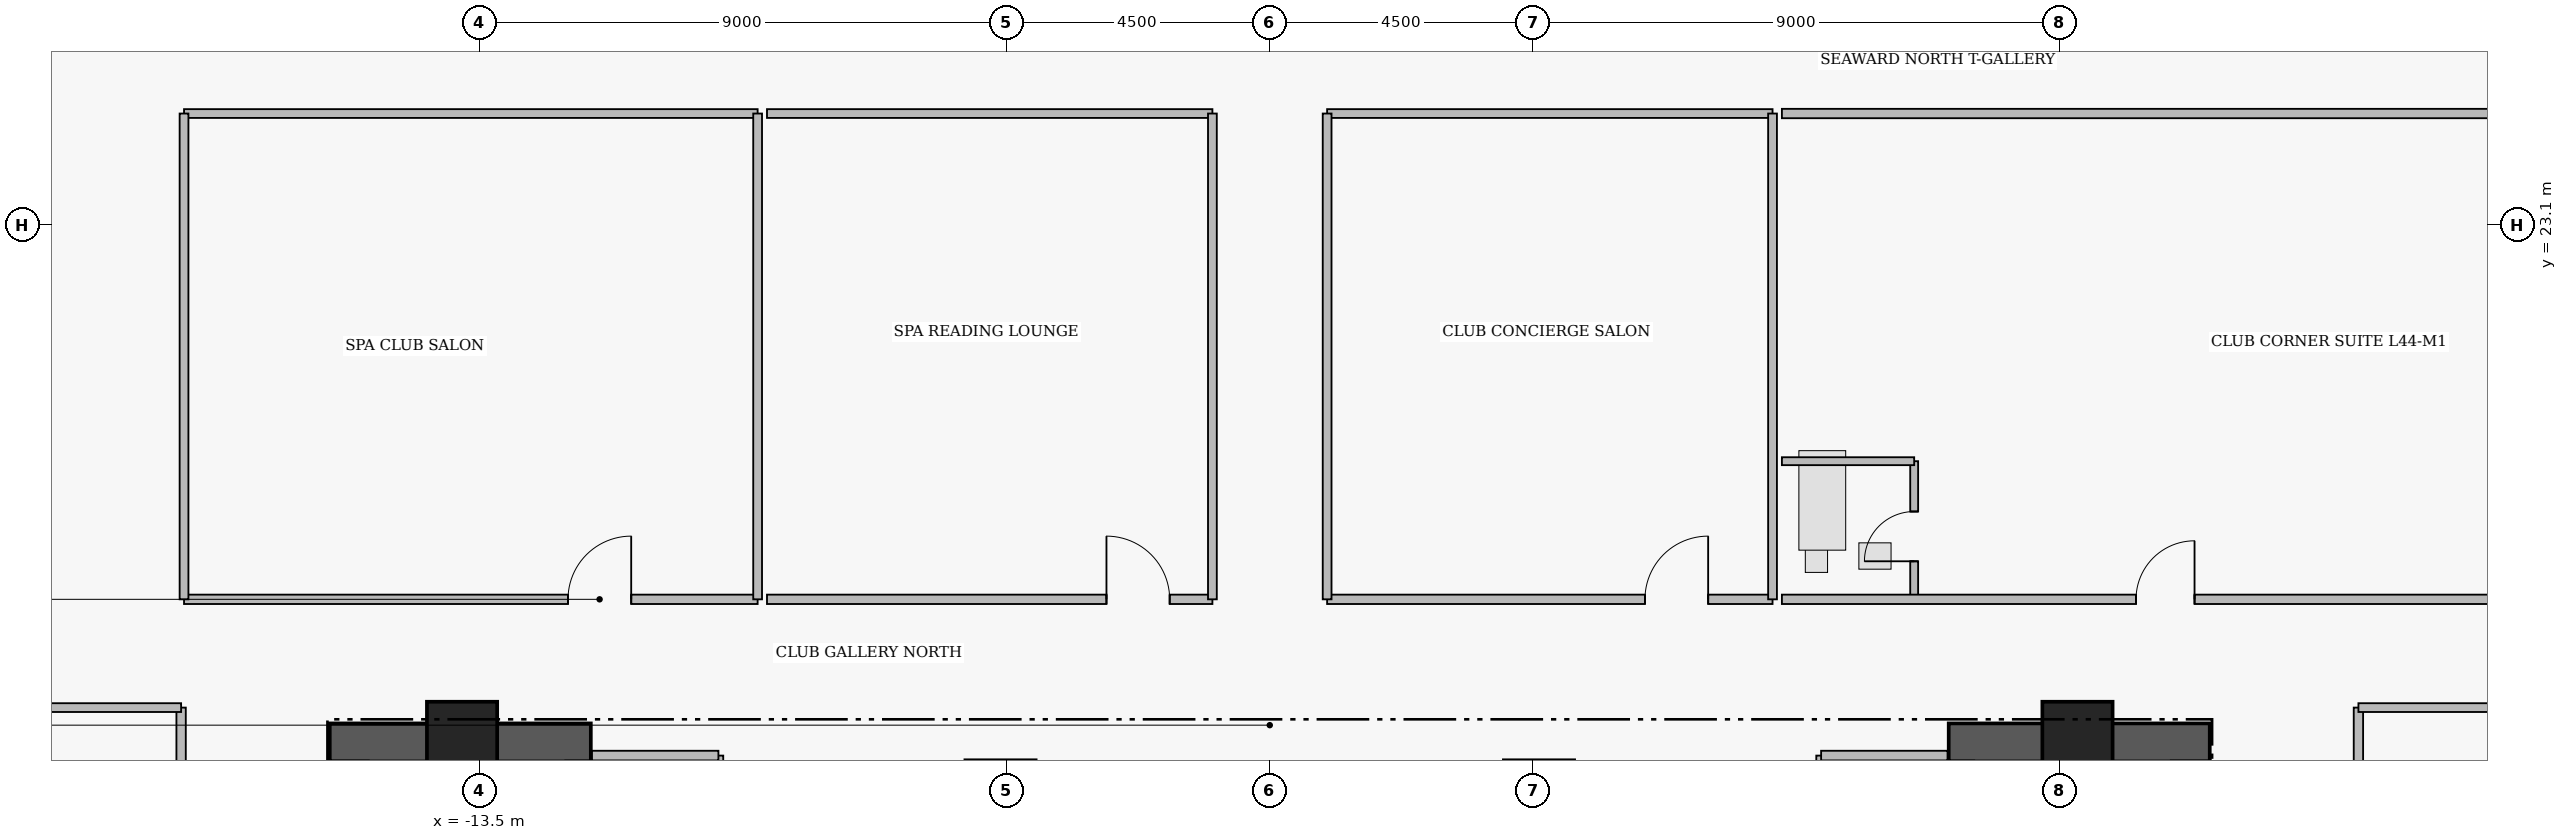
"""IFC4 building model, lengths in metres.
Left out: names, types, materials, properties, quantities, classifications, styles, units other than length and angle.
Written with IfcOpenShell. Run it as: python <this file> out.ifc"""

import sys

from ifc_helpers import new_model, si_unit, direction, frame, frame_2d, origin, origin_2d, place, context, subcontext, project, spatial, rectangle, extrude, element, fill, save


model = new_model("IFC4")
c1 = context("Model", 3, precision=1e-05, world=origin(), true_north=direction((0.0, 1.0)))
c2 = subcontext(c1, "Body", "Model", "MODEL_VIEW")
j1 = project(units=[si_unit("LENGTHUNIT", "METRE"), si_unit("PLANEANGLEUNIT", "RADIAN")], contexts=[c1])
p1 = place(None, origin())
s1 = spatial("IfcSite", under=j1, at=p1, CompositionType="ELEMENT")
p2 = place(p1, origin())
s2 = spatial("IfcBuilding", under=s1, at=p2, CompositionType="ELEMENT")
p3 = place(p2, frame((0.0, 0.0, 177.4)))
s3 = spatial("IfcBuildingStorey", under=s2, at=p3, CompositionType="ELEMENT", Elevation=177.4)
for number, where, z_axis, x_axis in (
    (1, (-16.06, 14.255, 0.0), (0.0, 0.0, 1.0), (1.0, 0.0, 0.0)),
    (2, (11.6, 14.255, 0.0), (0.0, 0.0, 1.0), (1.0, 0.0, 0.0)),
):
    element("IfcWall", number, at=place(p3, frame(where, z_axis=z_axis, x_axis=x_axis)), inside=s3, PredefinedType="SHEAR", context=c2, shape_type="SweptSolid", body=[
        extrude(rectangle(XDim=4.46, YDim=0.65, at=frame_2d((2.23, 0.0))), origin(), (0.0, 0.0, 1.0), 3.56),
    ])
for number, where, z_axis, x_axis in (
    (3, (-13.8, 14.35, 0.0), (0.0, 0.0, 1.0), (1.0, 0.0, 0.0)),
    (4, (-4.6, 13.35, 0.0), (0.0, 0.0, 1.0), (1.0, 0.0, 0.0)),
    (5, (4.6, 13.35, 0.0), (0.0, 0.0, 1.0), (1.0, 0.0, 0.0)),
    (6, (13.8, 14.35, 0.0), (0.0, 0.0, 1.0), (1.0, 0.0, 0.0)),
):
    element("IfcColumn", number, at=place(p3, frame(where, z_axis=z_axis, x_axis=x_axis)), inside=s3, PredefinedType="COLUMN", context=c2, shape_type="SweptSolid", body=[
        extrude(rectangle(XDim=1.2, YDim=1.2, at=origin_2d()), origin(), (0.0, 0.0, 1.0), 3.75),
    ])
p4 = place(p3, frame((-18.55, 16.7, 0.0), z_axis=(0.0, 0.0, 1.0), x_axis=(1.0, 0.0, 0.0)))
e7 = element("IfcWall", 7, at=p4, inside=s3, PredefinedType="PARTITIONING", context=c2, shape_type="SweptSolid", body=[
    extrude(rectangle(XDim=9.8, YDim=0.16, at=frame_2d((4.9, 0.0))), origin(), (0.0, 0.0, 1.0), 3.124),
])
p5 = place(p4, frame((6.56, 0.0, 0.0)))
e8 = element("IfcOpeningElement", 8, at=p5, cuts=e7, PredefinedType="OPENING", context=c2, shape_type="SweptSolid", body=[
    extrude(rectangle(XDim=1.08, YDim=2.18, at=frame_2d((0.54, 1.09))), frame((0.0, 0.09, 0.0), z_axis=(0.0, -1.0, 0.0), x_axis=(1.0, 0.0, 0.0)), (0.0, 0.0, 1.0), 0.18),
])
p6 = place(p3, frame((-8.59, 16.7, 0.0), z_axis=(0.0, 0.0, 1.0), x_axis=(1.0, 0.0, 0.0)))
e9 = element("IfcWall", 9, at=p6, inside=s3, PredefinedType="PARTITIONING", context=c2, shape_type="SweptSolid", body=[
    extrude(rectangle(XDim=7.61, YDim=0.16, at=frame_2d((3.805, 0.0))), origin(), (0.0, 0.0, 1.0), 3.124),
])
p7 = place(p6, frame((5.8, 0.0, 0.0)))
e10 = element("IfcOpeningElement", 10, at=p7, cuts=e9, PredefinedType="OPENING", context=c2, shape_type="SweptSolid", body=[
    extrude(rectangle(XDim=1.08, YDim=2.18, at=frame_2d((0.54, 1.09))), frame((0.0, 0.09, 0.0), z_axis=(0.0, -1.0, 0.0), x_axis=(1.0, 0.0, 0.0)), (0.0, 0.0, 1.0), 0.18),
])
p8 = place(p3, frame((0.98, 16.7, 0.0), z_axis=(0.0, 0.0, 1.0), x_axis=(1.0, 0.0, 0.0)))
e11 = element("IfcWall", 11, at=p8, inside=s3, PredefinedType="PARTITIONING", context=c2, shape_type="SweptSolid", body=[
    extrude(rectangle(XDim=7.61, YDim=0.16, at=frame_2d((3.805, 0.0))), origin(), (0.0, 0.0, 1.0), 3.124),
])
p9 = place(p8, frame((5.43, 0.0, 0.0)))
e12 = element("IfcOpeningElement", 12, at=p9, cuts=e11, PredefinedType="OPENING", context=c2, shape_type="SweptSolid", body=[
    extrude(rectangle(XDim=1.08, YDim=2.18, at=frame_2d((0.54, 1.09))), frame((0.0, 0.09, 0.0), z_axis=(0.0, -1.0, 0.0), x_axis=(1.0, 0.0, 0.0)), (0.0, 0.0, 1.0), 0.18),
])
p10 = place(p3, frame((11.01, 16.7, 0.0), z_axis=(0.0, 0.0, 1.0), x_axis=(0.0, 1.0, 0.0)))
e13 = element("IfcWall", 13, at=p10, inside=s3, PredefinedType="PLUMBINGWALL", context=c2, shape_type="SweptSolid", body=[
    extrude(rectangle(XDim=2.36, YDim=0.135, at=frame_2d((1.18, 0.0))), origin(), (0.0, 0.0, 1.0), 3.53),
])
p11 = place(p10, frame((0.65, 0.0, 0.0)))
e14 = element("IfcOpeningElement", 14, at=p11, cuts=e13, PredefinedType="OPENING", context=c2, shape_type="SweptSolid", body=[
    extrude(rectangle(XDim=0.85, YDim=2.1, at=frame_2d((0.425, 1.05))), frame((0.0, 0.077, 0.0), z_axis=(0.0, -1.0, 0.0), x_axis=(1.0, 0.0, 0.0)), (0.0, 0.0, 1.0), 0.155),
])
p12 = place(p3, frame((8.75, 16.7, 0.0), z_axis=(0.0, 0.0, 1.0), x_axis=(1.0, 0.0, 0.0)))
e15 = element("IfcWall", 15, at=p12, inside=s3, PredefinedType="PARTITIONING", context=c2, shape_type="SweptSolid", body=[
    extrude(rectangle(XDim=13.29, YDim=0.16, at=frame_2d((6.645, 0.0))), origin(), (0.0, 0.0, 1.0), 3.124),
])
p13 = place(p12, frame((6.05, 0.0, 0.0)))
e16 = element("IfcOpeningElement", 16, at=p13, cuts=e15, PredefinedType="OPENING", context=c2, shape_type="SweptSolid", body=[
    extrude(rectangle(XDim=1.0, YDim=2.15, at=frame_2d((0.5, 1.075))), frame((0.0, 0.09, 0.0), z_axis=(0.0, -1.0, 0.0), x_axis=(1.0, 0.0, 0.0)), (0.0, 0.0, 1.0), 0.18),
])
p14 = place(p3, frame((18.6, 7.96, 0.0), z_axis=(0.0, 0.0, 1.0), x_axis=(0.0, 1.0, 0.0)))
e17 = element("IfcWall", 17, at=p14, inside=s3, PredefinedType="PARTITIONING", context=c2, shape_type="SweptSolid", body=[
    extrude(rectangle(XDim=6.89, YDim=0.16, at=frame_2d((3.445, 0.0))), origin(), (0.0, 0.0, 1.0), 3.53),
])
p15 = place(p14, frame((2.985, 0.0, 0.0)))
e18 = element("IfcOpeningElement", 18, at=p15, cuts=e17, PredefinedType="OPENING", context=c2, shape_type="SweptSolid", body=[
    extrude(rectangle(XDim=0.92, YDim=2.12, at=frame_2d((0.46, 1.06))), frame((0.0, 0.09, 0.0), z_axis=(0.0, -1.0, 0.0), x_axis=(1.0, 0.0, 0.0)), (0.0, 0.0, 1.0), 0.18),
])
p16 = place(p3, frame((-18.6, 1.55, 0.0), z_axis=(0.0, 0.0, 1.0), x_axis=(0.0, 1.0, 0.0)))
e19 = element("IfcWall", 19, at=p16, inside=s3, PredefinedType="PARTITIONING", context=c2, shape_type="SweptSolid", body=[
    extrude(rectangle(XDim=13.3, YDim=0.16, at=frame_2d((6.65, 0.0))), origin(), (0.0, 0.0, 1.0), 3.53),
])
p17 = place(p16, frame((6.175, 0.0, 0.0)))
e20 = element("IfcOpeningElement", 20, at=p17, cuts=e19, PredefinedType="OPENING", context=c2, shape_type="SweptSolid", body=[
    extrude(rectangle(XDim=0.95, YDim=2.15, at=frame_2d((0.475, 1.075))), frame((0.0, 0.09, 0.0), z_axis=(0.0, -1.0, 0.0), x_axis=(1.0, 0.0, 0.0)), (0.0, 0.0, 1.0), 0.18),
])
p18 = place(p3, frame((-9.42, 11.07, 0.0), z_axis=(0.0, 0.0, 1.0), x_axis=(0.0, 1.0, 0.0)))
e21 = element("IfcWall", 21, at=p18, inside=s3, PredefinedType="PARTITIONING", context=c2, shape_type="SweptSolid", body=[
    extrude(rectangle(XDim=2.96, YDim=0.165, at=frame_2d((1.48, 0.0))), origin(), (0.0, 0.0, 1.0), 3.53),
])
p19 = place(p3, frame((-11.58, 14.03, 0.0), z_axis=(0.0, 0.0, 1.0), x_axis=(1.0, 0.0, 0.0)))
e22 = element("IfcWall", 22, at=p19, inside=s3, PredefinedType="PARTITIONING", context=c2, shape_type="SweptSolid", body=[
    extrude(rectangle(XDim=2.16, YDim=0.165, at=frame_2d((1.08, 0.0))), origin(), (0.0, 0.0, 1.0), 3.53),
])
p20 = place(p3, frame((9.42, 11.07, 0.0), z_axis=(0.0, 0.0, 1.0), x_axis=(0.0, 1.0, 0.0)))
e23 = element("IfcWall", 23, at=p20, inside=s3, PredefinedType="PARTITIONING", context=c2, shape_type="SweptSolid", body=[
    extrude(rectangle(XDim=2.96, YDim=0.165, at=frame_2d((1.48, 0.0))), origin(), (0.0, 0.0, 1.0), 3.53),
])
p21 = place(p3, frame((9.42, 14.03, 0.0), z_axis=(0.0, 0.0, 1.0), x_axis=(1.0, 0.0, 0.0)))
e24 = element("IfcWall", 24, at=p21, inside=s3, PredefinedType="PARTITIONING", context=c2, shape_type="SweptSolid", body=[
    extrude(rectangle(XDim=2.16, YDim=0.165, at=frame_2d((1.08, 0.0))), origin(), (0.0, 0.0, 1.0), 3.53),
])
p22 = place(p3, frame((-18.55, 25.0, 0.0), z_axis=(0.0, 0.0, 1.0), x_axis=(1.0, 0.0, 0.0)))
e25 = element("IfcWall", 25, at=p22, inside=s3, PredefinedType="PARTITIONING", context=c2, shape_type="SweptSolid", body=[
    extrude(rectangle(XDim=9.8, YDim=0.15, at=frame_2d((4.9, 0.0))), origin(), (0.0, 0.0, 1.0), 3.124),
])
for number, where, z_axis, x_axis in (
    (26, (-18.55, 16.7, 0.0), (0.0, 0.0, 1.0), (0.0, 1.0, 0.0)),
    (27, (-8.75, 16.7, 0.0), (0.0, 0.0, 1.0), (0.0, 1.0, 0.0)),
):
    element("IfcWall", number, at=place(p3, frame(where, z_axis=z_axis, x_axis=x_axis)), inside=s3, PredefinedType="PARTITIONING", context=c2, shape_type="SweptSolid", body=[
        extrude(rectangle(XDim=8.3, YDim=0.15, at=frame_2d((4.15, 0.0))), origin(), (0.0, 0.0, 1.0), 3.53),
    ])
p23 = place(p3, frame((-8.59, 25.0, 0.0), z_axis=(0.0, 0.0, 1.0), x_axis=(1.0, 0.0, 0.0)))
e28 = element("IfcWall", 28, at=p23, inside=s3, PredefinedType="PARTITIONING", context=c2, shape_type="SweptSolid", body=[
    extrude(rectangle(XDim=7.61, YDim=0.15, at=frame_2d((3.805, 0.0))), origin(), (0.0, 0.0, 1.0), 3.124),
])
p24 = place(p3, frame((-0.98, 16.7, 0.0), z_axis=(0.0, 0.0, 1.0), x_axis=(0.0, 1.0, 0.0)))
e29 = element("IfcWall", 29, at=p24, inside=s3, PredefinedType="PARTITIONING", context=c2, shape_type="SweptSolid", body=[
    extrude(rectangle(XDim=8.3, YDim=0.15, at=frame_2d((4.15, 0.0))), origin(), (0.0, 0.0, 1.0), 3.53),
])
p25 = place(p3, frame((0.98, 25.0, 0.0), z_axis=(0.0, 0.0, 1.0), x_axis=(1.0, 0.0, 0.0)))
e30 = element("IfcWall", 30, at=p25, inside=s3, PredefinedType="PARTITIONING", context=c2, shape_type="SweptSolid", body=[
    extrude(rectangle(XDim=7.61, YDim=0.15, at=frame_2d((3.805, 0.0))), origin(), (0.0, 0.0, 1.0), 3.124),
])
for number, where, z_axis, x_axis in (
    (31, (0.98, 16.7, 0.0), (0.0, 0.0, 1.0), (0.0, 1.0, 0.0)),
    (32, (8.59, 16.7, 0.0), (0.0, 0.0, 1.0), (0.0, 1.0, 0.0)),
):
    element("IfcWall", number, at=place(p3, frame(where, z_axis=z_axis, x_axis=x_axis)), inside=s3, PredefinedType="PARTITIONING", context=c2, shape_type="SweptSolid", body=[
        extrude(rectangle(XDim=8.3, YDim=0.15, at=frame_2d((4.15, 0.0))), origin(), (0.0, 0.0, 1.0), 3.53),
    ])
p26 = place(p3, frame((8.75, 19.06, 0.0), z_axis=(0.0, 0.0, 1.0), x_axis=(1.0, 0.0, 0.0)))
e33 = element("IfcWall", 33, at=p26, inside=s3, PredefinedType="PLUMBINGWALL", context=c2, shape_type="SweptSolid", body=[
    extrude(rectangle(XDim=2.26, YDim=0.135, at=frame_2d((1.13, 0.0))), origin(), (0.0, 0.0, 1.0), 3.124),
])
p27 = place(p3, frame((8.75, 25.0, 0.0), z_axis=(0.0, 0.0, 1.0), x_axis=(1.0, 0.0, 0.0)))
e34 = element("IfcWall", 34, at=p27, inside=s3, PredefinedType="PARTITIONING", context=c2, shape_type="SweptSolid", body=[
    extrude(rectangle(XDim=13.29, YDim=0.16, at=frame_2d((6.645, 0.0))), origin(), (0.0, 0.0, 1.0), 3.124),
])
for number, where, z_axis, x_axis in (
    (35, (18.6, 14.85, 0.0), (0.0, 0.0, 1.0), (1.0, 0.0, 0.0)),
    (36, (-23.638, 14.85, 0.0), (0.0, 0.0, 1.0), (1.0, 0.0, 0.0)),
):
    element("IfcWall", number, at=place(p3, frame(where, z_axis=z_axis, x_axis=x_axis)), inside=s3, PredefinedType="PARTITIONING", context=c2, shape_type="SweptSolid", body=[
        extrude(rectangle(XDim=5.038, YDim=0.15, at=frame_2d((2.519, 0.0))), origin(), (0.0, 0.0, 1.0), 3.53),
    ])
p28 = place(p5, origin())
e37 = element("IfcDoor", 37, at=p28, inside=s3, OperationType="SINGLE_SWING_RIGHT", PredefinedType="DOOR", context=c2, shape_type="SweptSolid", body=[
    extrude(rectangle(XDim=1.08, YDim=2.18, at=frame_2d((0.54, 1.09))), frame((0.0, 0.025, 0.0), z_axis=(0.0, -1.0, 0.0), x_axis=(1.0, 0.0, 0.0)), (0.0, 0.0, 1.0), 0.05),
])
fill(e8, e37)
p29 = place(p7, origin())
e38 = element("IfcDoor", 38, at=p29, inside=s3, OperationType="SINGLE_SWING_LEFT", PredefinedType="DOOR", context=c2, shape_type="SweptSolid", body=[
    extrude(rectangle(XDim=1.08, YDim=2.18, at=frame_2d((0.54, 1.09))), frame((0.0, 0.025, 0.0), z_axis=(0.0, -1.0, 0.0), x_axis=(1.0, 0.0, 0.0)), (0.0, 0.0, 1.0), 0.05),
])
fill(e10, e38)
p30 = place(p9, origin())
e39 = element("IfcDoor", 39, at=p30, inside=s3, OperationType="SINGLE_SWING_RIGHT", PredefinedType="DOOR", context=c2, shape_type="SweptSolid", body=[
    extrude(rectangle(XDim=1.08, YDim=2.18, at=frame_2d((0.54, 1.09))), frame((0.0, 0.025, 0.0), z_axis=(0.0, -1.0, 0.0), x_axis=(1.0, 0.0, 0.0)), (0.0, 0.0, 1.0), 0.05),
])
fill(e12, e39)
p31 = place(p11, origin())
e40 = element("IfcDoor", 40, at=p31, inside=s3, OperationType="SINGLE_SWING_LEFT", PredefinedType="DOOR", context=c2, shape_type="SweptSolid", body=[
    extrude(rectangle(XDim=0.85, YDim=2.1, at=frame_2d((0.425, 1.05))), frame((0.0, 0.025, 0.0), z_axis=(0.0, -1.0, 0.0), x_axis=(1.0, 0.0, 0.0)), (0.0, 0.0, 1.0), 0.05),
])
fill(e14, e40)
p32 = place(p13, origin())
e41 = element("IfcDoor", 41, at=p32, inside=s3, OperationType="SINGLE_SWING_RIGHT", PredefinedType="DOOR", context=c2, shape_type="SweptSolid", body=[
    extrude(rectangle(XDim=1.0, YDim=2.15, at=frame_2d((0.5, 1.075))), frame((0.0, 0.025, 0.0), z_axis=(0.0, -1.0, 0.0), x_axis=(1.0, 0.0, 0.0)), (0.0, 0.0, 1.0), 0.05),
])
fill(e16, e41)
save(model, sys.argv[1])
